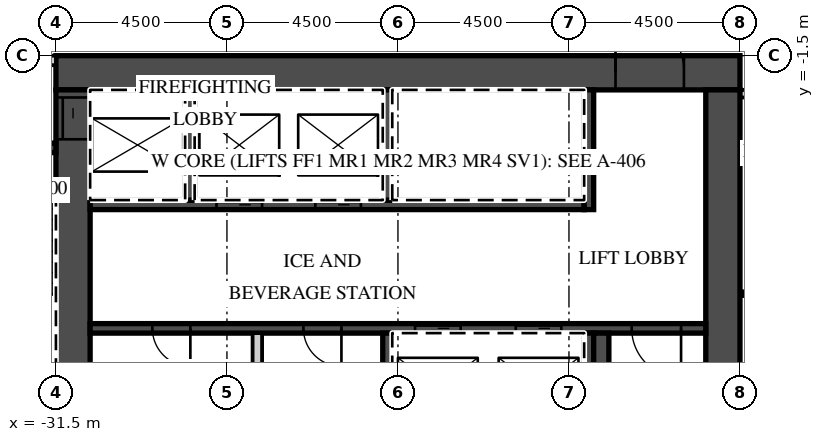
"""IFC4 building model, lengths in metres.
Left out: names, types, materials, properties, quantities, classifications, styles, units other than length and angle.
Written with IfcOpenShell. Run it as: python <this file> out.ifc"""

import sys

from ifc_helpers import new_model, si_unit, direction, frame, frame_2d, origin, place, context, subcontext, project, spatial, rectangle, extrude, element, fill, save


model = new_model("IFC4")
c1 = context("Model", 3, precision=1e-05, world=origin(), true_north=direction((0.0, 1.0)))
c2 = subcontext(c1, "Body", "Model", "MODEL_VIEW")
j1 = project(units=[si_unit("LENGTHUNIT", "METRE"), si_unit("PLANEANGLEUNIT", "RADIAN")], contexts=[c1])
p1 = place(None, origin())
s1 = spatial("IfcSite", under=j1, at=p1, CompositionType="ELEMENT")
p2 = place(p1, origin())
s2 = spatial("IfcBuilding", under=s1, at=p2, CompositionType="ELEMENT")
p3 = place(p2, frame((0.0, 0.0, 180.1)))
s3 = spatial("IfcBuildingStorey", under=s2, at=p3, CompositionType="ELEMENT", Elevation=180.1)
p4 = place(p3, frame((-13.5, -2.5, 0.0), z_axis=(0.0, 0.0, 1.0), x_axis=(1.0, 0.0, 0.0)))
e1 = element("IfcWall", 1, at=p4, inside=s3, PredefinedType="PARTITIONING", context=c2, shape_type="SweptSolid", body=[
    extrude(rectangle(XDim=27.0, YDim=0.2, at=frame_2d((13.5, 0.0))), origin(), (0.0, 0.0, 1.0), 3.02),
])
p5 = place(p4, frame((2.925, 0.0, 0.0)))
e2 = element("IfcOpeningElement", 2, at=p5, cuts=e1, PredefinedType="OPENING", context=c2, shape_type="SweptSolid", body=[
    extrude(rectangle(XDim=1.0, YDim=2.1, at=frame_2d((0.5, 1.05))), frame((0.0, 0.11, 0.0), z_axis=(0.0, -1.0, 0.0), x_axis=(1.0, 0.0, 0.0)), (0.0, 0.0, 1.0), 0.22),
])
p6 = place(p4, frame((7.45, 0.0, 0.0)))
e3 = element("IfcOpeningElement", 3, at=p6, cuts=e1, PredefinedType="OPENING", context=c2, shape_type="SweptSolid", body=[
    extrude(rectangle(XDim=1.0, YDim=2.1, at=frame_2d((0.5, 1.05))), frame((0.0, 0.11, 0.0), z_axis=(0.0, -1.0, 0.0), x_axis=(1.0, 0.0, 0.0)), (0.0, 0.0, 1.0), 0.22),
])
p7 = place(p4, frame((11.925, 0.0, 0.0)))
e4 = element("IfcOpeningElement", 4, at=p7, cuts=e1, PredefinedType="OPENING", context=c2, shape_type="SweptSolid", body=[
    extrude(rectangle(XDim=1.0, YDim=2.1, at=frame_2d((0.5, 1.05))), frame((0.0, 0.11, 0.0), z_axis=(0.0, -1.0, 0.0), x_axis=(1.0, 0.0, 0.0)), (0.0, 0.0, 1.0), 0.22),
])
p8 = place(p4, frame((18.862, 0.0, 0.0)))
e5 = element("IfcOpeningElement", 5, at=p8, cuts=e1, PredefinedType="OPENING", context=c2, shape_type="SweptSolid", body=[
    extrude(rectangle(XDim=1.2, YDim=2.1, at=frame_2d((0.6, 1.05))), frame((0.0, 0.11, 0.0), z_axis=(0.0, -1.0, 0.0), x_axis=(1.0, 0.0, 0.0)), (0.0, 0.0, 1.0), 0.22),
])
p9 = place(p4, frame((25.425, 0.0, 0.0)))
e6 = element("IfcOpeningElement", 6, at=p9, cuts=e1, PredefinedType="OPENING", context=c2, shape_type="SweptSolid", body=[
    extrude(rectangle(XDim=1.0, YDim=2.1, at=frame_2d((0.5, 1.05))), frame((0.0, 0.11, 0.0), z_axis=(0.0, -1.0, 0.0), x_axis=(1.0, 0.0, 0.0)), (0.0, 0.0, 1.0), 0.22),
])
p10 = place(p3, frame((-31.5, -1.95, 0.0), z_axis=(0.0, 0.0, 1.0), x_axis=(1.0, 0.0, 0.0)))
e7 = element("IfcWall", 7, at=p10, inside=s3, PredefinedType="SHEAR", context=c2, shape_type="SweptSolid", body=[
    extrude(rectangle(XDim=18.0, YDim=0.9, at=frame_2d((9.0, 0.0))), origin(), (0.0, 0.0, 1.0), 3.02),
])
p11 = place(p10, frame((14.725, 0.0, 0.0)))
e8 = element("IfcOpeningElement", 8, at=p11, cuts=e7, PredefinedType="OPENING", context=c2, shape_type="SweptSolid", body=[
    extrude(rectangle(XDim=1.8, YDim=2.1, at=frame_2d((0.9, 1.05))), frame((0.0, 0.46, 0.0), z_axis=(0.0, -1.0, 0.0), x_axis=(1.0, 0.0, 0.0)), (0.0, 0.0, 1.0), 0.92),
])
p12 = place(p3, frame((-31.05, -15.2, 0.0), z_axis=(0.0, 0.0, 1.0), x_axis=(0.0, 1.0, 0.0)))
e9 = element("IfcWall", 9, at=p12, inside=s3, PredefinedType="SHEAR", context=c2, shape_type="SweptSolid", body=[
    extrude(rectangle(XDim=12.8, YDim=0.9, at=frame_2d((6.4, 0.0))), origin(), (0.0, 0.0, 1.0), 3.02),
])
p13 = place(p12, frame((11.5, 0.0, 0.0)))
e10 = element("IfcOpeningElement", 10, at=p13, cuts=e9, PredefinedType="OPENING", context=c2, shape_type="SweptSolid", body=[
    extrude(rectangle(XDim=1.1, YDim=2.1, at=frame_2d((0.55, 1.05))), frame((0.0, 0.46, 0.0), z_axis=(0.0, -1.0, 0.0), x_axis=(1.0, 0.0, 0.0)), (0.0, 0.0, 1.0), 0.92),
])
p14 = place(p3, frame((-13.95, -14.6, 0.0), z_axis=(0.0, 0.0, 1.0), x_axis=(0.0, 1.0, 0.0)))
e11 = element("IfcWall", 11, at=p14, inside=s3, PredefinedType="SHEAR", context=c2, shape_type="SweptSolid", body=[
    extrude(rectangle(XDim=12.2, YDim=0.9, at=frame_2d((6.1, 0.0))), origin(), (0.0, 0.0, 1.0), 3.02),
])
p15 = place(p3, frame((-30.6, -5.425, 0.0), z_axis=(0.0, 0.0, 1.0), x_axis=(1.0, 0.0, 0.0)))
e12 = element("IfcWall", 12, at=p15, inside=s3, PredefinedType="SHEAR", context=c2, shape_type="SweptSolid", body=[
    extrude(rectangle(XDim=13.0, YDim=0.25, at=frame_2d((6.5, 0.0))), origin(), (0.0, 0.0, 1.0), 3.02),
])
p16 = place(p15, frame((3.325, 0.0, 0.0)))
e13 = element("IfcOpeningElement", 13, at=p16, cuts=e12, PredefinedType="OPENING", context=c2, shape_type="SweptSolid", body=[
    extrude(rectangle(XDim=1.2, YDim=2.1, at=frame_2d((0.6, 1.05))), frame((0.0, 0.135, 0.0), z_axis=(0.0, -1.0, 0.0), x_axis=(1.0, 0.0, 0.0)), (0.0, 0.0, 1.0), 0.27),
])
p17 = place(p15, frame((5.925, 0.0, 0.0)))
e14 = element("IfcOpeningElement", 14, at=p17, cuts=e12, PredefinedType="OPENING", context=c2, shape_type="SweptSolid", body=[
    extrude(rectangle(XDim=1.2, YDim=2.1, at=frame_2d((0.6, 1.05))), frame((0.0, 0.135, 0.0), z_axis=(0.0, -1.0, 0.0), x_axis=(1.0, 0.0, 0.0)), (0.0, 0.0, 1.0), 0.27),
])
p18 = place(p3, frame((-17.475, -5.55, 0.0), z_axis=(0.0, 0.0, 1.0), x_axis=(0.0, 1.0, 0.0)))
e15 = element("IfcWall", 15, at=p18, inside=s3, PredefinedType="SHEAR", context=c2, shape_type="SweptSolid", body=[
    extrude(rectangle(XDim=3.15, YDim=0.25, at=frame_2d((1.575, 0.0))), origin(), (0.0, 0.0, 1.0), 3.02),
])
for number, where, z_axis, x_axis in (
    (16, (-27.975, -5.3, 0.0), (0.0, 0.0, 1.0), (0.0, 1.0, 0.0)),
    (17, (-22.775, -5.3, 0.0), (0.0, 0.0, 1.0), (0.0, 1.0, 0.0)),
):
    element("IfcWall", number, at=place(p3, frame(where, z_axis=z_axis, x_axis=x_axis)), inside=s3, PredefinedType="SHEAR", context=c2, shape_type="SweptSolid", body=[
        extrude(rectangle(XDim=2.9, YDim=0.25, at=frame_2d((1.45, 0.0))), origin(), (0.0, 0.0, 1.0), 3.02),
    ])
p19 = place(p3, frame((-30.6, -8.675, 0.0), z_axis=(0.0, 0.0, 1.0), x_axis=(1.0, 0.0, 0.0)))
e18 = element("IfcWall", 18, at=p19, inside=s3, PredefinedType="SHEAR", context=c2, shape_type="SweptSolid", body=[
    extrude(rectangle(XDim=16.2, YDim=0.25, at=frame_2d((8.1, 0.0))), origin(), (0.0, 0.0, 1.0), 3.02),
])
p20 = place(p19, frame((8.55, 0.0, 0.0)))
e19 = element("IfcOpeningElement", 19, at=p20, cuts=e18, PredefinedType="OPENING", context=c2, shape_type="SweptSolid", body=[
    extrude(rectangle(XDim=1.2, YDim=2.1, at=frame_2d((0.6, 1.05))), frame((0.0, 0.135, 0.0), z_axis=(0.0, -1.0, 0.0), x_axis=(1.0, 0.0, 0.0)), (0.0, 0.0, 1.0), 0.27),
])
p21 = place(p19, frame((11.2, 0.0, 0.0)))
e20 = element("IfcOpeningElement", 20, at=p21, cuts=e18, PredefinedType="OPENING", context=c2, shape_type="SweptSolid", body=[
    extrude(rectangle(XDim=1.2, YDim=2.1, at=frame_2d((0.6, 1.05))), frame((0.0, 0.135, 0.0), z_axis=(0.0, -1.0, 0.0), x_axis=(1.0, 0.0, 0.0)), (0.0, 0.0, 1.0), 0.27),
])
p22 = place(p19, frame((14.25, 0.0, 0.0)))
e21 = element("IfcOpeningElement", 21, at=p22, cuts=e18, PredefinedType="OPENING", context=c2, shape_type="SweptSolid", body=[
    extrude(rectangle(XDim=1.3, YDim=2.1, at=frame_2d((0.65, 1.05))), frame((0.0, 0.135, 0.0), z_axis=(0.0, -1.0, 0.0), x_axis=(1.0, 0.0, 0.0)), (0.0, 0.0, 1.0), 0.27),
])
p23 = place(p19, frame((1.637, 0.0, 0.0)))
e22 = element("IfcOpeningElement", 22, at=p23, cuts=e18, PredefinedType="OPENING", context=c2, shape_type="SweptSolid", body=[
    extrude(rectangle(XDim=1.0, YDim=2.1, at=frame_2d((0.5, 1.05))), frame((0.0, 0.135, 0.0), z_axis=(0.0, -1.0, 0.0), x_axis=(1.0, 0.0, 0.0)), (0.0, 0.0, 1.0), 0.27),
])
p24 = place(p19, frame((5.613, 0.0, 0.0)))
e23 = element("IfcOpeningElement", 23, at=p24, cuts=e18, PredefinedType="OPENING", context=c2, shape_type="SweptSolid", body=[
    extrude(rectangle(XDim=1.0, YDim=2.1, at=frame_2d((0.5, 1.05))), frame((0.0, 0.135, 0.0), z_axis=(0.0, -1.0, 0.0), x_axis=(1.0, 0.0, 0.0)), (0.0, 0.0, 1.0), 0.27),
])
for number, where, z_axis, x_axis in (
    (24, (-17.475, -11.7, 0.0), (0.0, 0.0, 1.0), (0.0, 1.0, 0.0)),
    (25, (-22.775, -11.7, 0.0), (0.0, 0.0, 1.0), (0.0, 1.0, 0.0)),
):
    element("IfcWall", number, at=place(p3, frame(where, z_axis=z_axis, x_axis=x_axis)), inside=s3, PredefinedType="SHEAR", context=c2, shape_type="SweptSolid", body=[
        extrude(rectangle(XDim=2.9, YDim=0.25, at=frame_2d((1.45, 0.0))), origin(), (0.0, 0.0, 1.0), 3.02),
    ])
p25 = place(p3, frame((-26.2, -11.7, 0.0), z_axis=(0.0, 0.0, 1.0), x_axis=(0.0, 1.0, 0.0)))
e26 = element("IfcWall", 26, at=p25, inside=s3, PredefinedType="PARTITIONING", context=c2, shape_type="SweptSolid", body=[
    extrude(rectangle(XDim=2.9, YDim=0.25, at=frame_2d((1.45, 0.0))), origin(), (0.0, 0.0, 1.0), 3.02),
])
p26 = place(p3, frame((-17.15, -14.6, 0.0), z_axis=(0.0, 0.0, 1.0), x_axis=(0.0, 1.0, 0.0)))
e27 = element("IfcWall", 27, at=p26, inside=s3, PredefinedType="SHEAR", context=c2, shape_type="SweptSolid", body=[
    extrude(rectangle(XDim=5.8, YDim=0.4, at=frame_2d((2.9, 0.0))), origin(), (0.0, 0.0, 1.0), 3.02),
])
p27 = place(p3, frame((-42.632, -1.625, 0.0), z_axis=(0.0, 0.0, 1.0), x_axis=(1.0, 0.0, 0.0)))
e28 = element("IfcWall", 28, at=p27, inside=s3, PredefinedType="PARTITIONING", context=c2, shape_type="SweptSolid", body=[
    extrude(rectangle(XDim=11.132, YDim=0.25, at=frame_2d((5.566, 0.0))), origin(), (0.0, 0.0, 1.0), 3.02),
])
p28 = place(p27, frame((9.207, 0.0, 0.0)))
e29 = element("IfcOpeningElement", 29, at=p28, cuts=e28, PredefinedType="OPENING", context=c2, shape_type="SweptSolid", body=[
    extrude(rectangle(XDim=1.3, YDim=2.1, at=frame_2d((0.65, 1.05))), frame((0.0, 0.135, 0.0), z_axis=(0.0, -1.0, 0.0), x_axis=(1.0, 0.0, 0.0)), (0.0, 0.0, 1.0), 0.27),
])
p29 = place(p27, frame((6.781, 0.0, 0.0)))
e30 = element("IfcOpeningElement", 30, at=p29, cuts=e28, PredefinedType="OPENING", context=c2, shape_type="SweptSolid", body=[
    extrude(rectangle(XDim=1.1, YDim=2.1, at=frame_2d((0.55, 1.05))), frame((0.0, 0.135, 0.0), z_axis=(0.0, -1.0, 0.0), x_axis=(1.0, 0.0, 0.0)), (0.0, 0.0, 1.0), 0.27),
])
p30 = place(p3, frame((-34.05, -3.925, 0.0), z_axis=(0.0, 0.0, 1.0), x_axis=(1.0, 0.0, 0.0)))
e31 = element("IfcWall", 31, at=p30, inside=s3, PredefinedType="SHEAR", context=c2, shape_type="SweptSolid", body=[
    extrude(rectangle(XDim=2.55, YDim=0.25, at=frame_2d((1.275, 0.0))), origin(), (0.0, 0.0, 1.0), 3.02),
])
p31 = place(p30, frame((0.625, 0.0, 0.0)))
e32 = element("IfcOpeningElement", 32, at=p31, cuts=e31, PredefinedType="OPENING", context=c2, shape_type="SweptSolid", body=[
    extrude(rectangle(XDim=1.3, YDim=2.1, at=frame_2d((0.65, 1.05))), frame((0.0, 0.135, 0.0), z_axis=(0.0, -1.0, 0.0), x_axis=(1.0, 0.0, 0.0)), (0.0, 0.0, 1.0), 0.27),
])
p32 = place(p20, origin())
e33 = element("IfcDoor", 33, at=p32, inside=s3, OperationType="SLIDING_TO_LEFT", PredefinedType="DOOR", context=c2, shape_type="SweptSolid", body=[
    extrude(rectangle(XDim=1.2, YDim=2.1, at=frame_2d((0.6, 1.05))), frame((0.0, 0.025, 0.0), z_axis=(0.0, -1.0, 0.0), x_axis=(1.0, 0.0, 0.0)), (0.0, 0.0, 1.0), 0.05),
])
fill(e19, e33)
p33 = place(p21, origin())
e34 = element("IfcDoor", 34, at=p33, inside=s3, OperationType="SLIDING_TO_RIGHT", PredefinedType="DOOR", context=c2, shape_type="SweptSolid", body=[
    extrude(rectangle(XDim=1.2, YDim=2.1, at=frame_2d((0.6, 1.05))), frame((0.0, 0.025, 0.0), z_axis=(0.0, -1.0, 0.0), x_axis=(1.0, 0.0, 0.0)), (0.0, 0.0, 1.0), 0.05),
])
fill(e20, e34)
p34 = place(p16, origin())
e35 = element("IfcDoor", 35, at=p34, inside=s3, OperationType="SLIDING_TO_RIGHT", PredefinedType="DOOR", context=c2, shape_type="SweptSolid", body=[
    extrude(rectangle(XDim=1.2, YDim=2.1, at=frame_2d((0.6, 1.05))), frame((0.0, 0.025, 0.0), z_axis=(0.0, -1.0, 0.0), x_axis=(1.0, 0.0, 0.0)), (0.0, 0.0, 1.0), 0.05),
])
fill(e13, e35)
p35 = place(p17, origin())
e36 = element("IfcDoor", 36, at=p35, inside=s3, OperationType="SLIDING_TO_RIGHT", PredefinedType="DOOR", context=c2, shape_type="SweptSolid", body=[
    extrude(rectangle(XDim=1.2, YDim=2.1, at=frame_2d((0.6, 1.05))), frame((0.0, 0.025, 0.0), z_axis=(0.0, -1.0, 0.0), x_axis=(1.0, 0.0, 0.0)), (0.0, 0.0, 1.0), 0.05),
])
fill(e14, e36)
p36 = place(p13, origin())
e37 = element("IfcDoor", 37, at=p36, inside=s3, OperationType="SLIDING_TO_RIGHT", PredefinedType="DOOR", context=c2, shape_type="SweptSolid", body=[
    extrude(rectangle(XDim=1.1, YDim=2.1, at=frame_2d((0.55, 1.05))), frame((0.0, 0.025, 0.0), z_axis=(0.0, -1.0, 0.0), x_axis=(1.0, 0.0, 0.0)), (0.0, 0.0, 1.0), 0.05),
])
fill(e10, e37)
p37 = place(p11, origin())
e38 = element("IfcDoor", 38, at=p37, inside=s3, OperationType="DOUBLE_DOOR_DOUBLE_SWING", PredefinedType="DOOR", context=c2, shape_type="SweptSolid", body=[
    extrude(rectangle(XDim=1.8, YDim=2.1, at=frame_2d((0.9, 1.05))), frame((0.0, 0.025, 0.0), z_axis=(0.0, -1.0, 0.0), x_axis=(1.0, 0.0, 0.0)), (0.0, 0.0, 1.0), 0.05),
])
fill(e8, e38)
p38 = place(p22, origin())
e39 = element("IfcDoor", 39, at=p38, inside=s3, OperationType="SINGLE_SWING_RIGHT", PredefinedType="DOOR", context=c2, shape_type="SweptSolid", body=[
    extrude(rectangle(XDim=1.3, YDim=2.1, at=frame_2d((0.65, 1.05))), frame((0.0, 0.025, 0.0), z_axis=(0.0, -1.0, 0.0), x_axis=(1.0, 0.0, 0.0)), (0.0, 0.0, 1.0), 0.05),
])
fill(e21, e39)
p39 = place(p23, origin())
e40 = element("IfcDoor", 40, at=p39, inside=s3, OperationType="SINGLE_SWING_RIGHT", PredefinedType="DOOR", context=c2, shape_type="SweptSolid", body=[
    extrude(rectangle(XDim=1.0, YDim=2.1, at=frame_2d((0.5, 1.05))), frame((0.0, 0.025, 0.0), z_axis=(0.0, -1.0, 0.0), x_axis=(1.0, 0.0, 0.0)), (0.0, 0.0, 1.0), 0.05),
])
fill(e22, e40)
p40 = place(p24, origin())
e41 = element("IfcDoor", 41, at=p40, inside=s3, OperationType="SINGLE_SWING_RIGHT", PredefinedType="DOOR", context=c2, shape_type="SweptSolid", body=[
    extrude(rectangle(XDim=1.0, YDim=2.1, at=frame_2d((0.5, 1.05))), frame((0.0, 0.025, 0.0), z_axis=(0.0, -1.0, 0.0), x_axis=(1.0, 0.0, 0.0)), (0.0, 0.0, 1.0), 0.05),
])
fill(e23, e41)
save(model, sys.argv[1])
